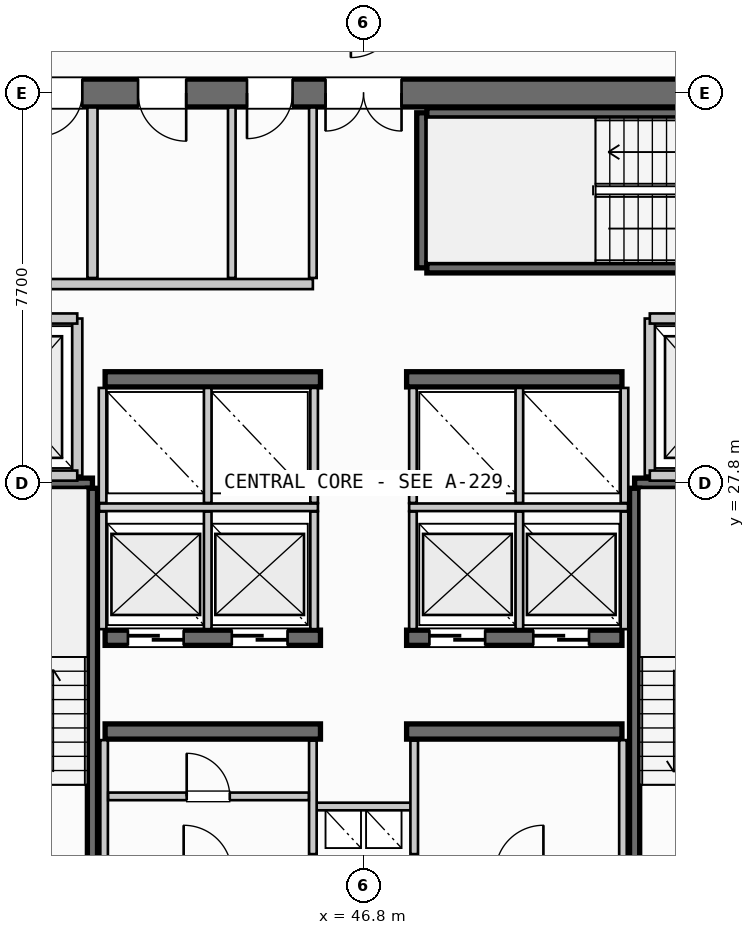
"""IFC4 building model, lengths in metres.
Left out: names, types, materials, properties, quantities, classifications, styles, units other than length and angle.
Written with IfcOpenShell. Run it as: python <this file> out.ifc"""

import sys

from ifc_helpers import new_model, si_unit, direction, frame, frame_2d, origin, place, context, subcontext, project, spatial, rectangle, extrude, source, transform, mapped, element, fill, save


model = new_model("IFC4")
c1 = context("Model", 3, precision=1e-05, world=origin(), true_north=direction((0.0, 1.0)))
c2 = subcontext(c1, "Body", "Model", "MODEL_VIEW")
j1 = project(units=[si_unit("LENGTHUNIT", "METRE"), si_unit("PLANEANGLEUNIT", "RADIAN")], contexts=[c1])
p1 = place(None, origin())
s1 = spatial("IfcSite", under=j1, at=p1, CompositionType="ELEMENT")
p2 = place(p1, origin())
s2 = spatial("IfcBuilding", under=s1, at=p2, CompositionType="ELEMENT")
p3 = place(p2, frame((0.0, 0.0, 211.4)))
s3 = spatial("IfcBuildingStorey", under=s2, at=p3, CompositionType="ELEMENT", Elevation=211.4)
p4 = place(p3, frame((55.6, 35.5, 0.0), z_axis=(0.0, 0.0, 1.0), x_axis=(-1.0, 0.0, 0.0)))
e1 = element("IfcWall", 1, at=p4, inside=s3, PredefinedType="SHEAR", context=c2, shape_type="SweptSolid", body=[
    extrude(rectangle(XDim=17.6, YDim=0.55, at=frame_2d((8.8, 0.0))), origin(), (0.0, 0.0, 1.0), 3.26),
])
p5 = place(p4, frame((8.05, 0.0, 0.0)))
e2 = element("IfcOpeningElement", 2, at=p5, cuts=e1, PredefinedType="OPENING", context=c2, shape_type="SweptSolid", body=[
    extrude(rectangle(XDim=1.5, YDim=2.2, at=frame_2d((0.75, 1.1))), frame((0.0, 0.285, 0.0), z_axis=(0.0, -1.0, 0.0), x_axis=(1.0, 0.0, 0.0)), (0.0, 0.0, 1.0), 0.57),
])
p6 = place(p4, frame((15.85, 0.0, 0.0)))
e3 = element("IfcOpeningElement", 3, at=p6, cuts=e1, PredefinedType="OPENING", context=c2, shape_type="SweptSolid", body=[
    extrude(rectangle(XDim=0.85, YDim=2.15, at=frame_2d((0.425, 1.075))), frame((0.0, 0.285, 0.0), z_axis=(0.0, -1.0, 0.0), x_axis=(1.0, 0.0, 0.0)), (0.0, 0.0, 1.0), 0.57),
])
p7 = place(p4, frame((14.35, 0.0, 0.0)))
e4 = element("IfcOpeningElement", 4, at=p7, cuts=e1, PredefinedType="OPENING", context=c2, shape_type="SweptSolid", body=[
    extrude(rectangle(XDim=0.85, YDim=2.15, at=frame_2d((0.425, 1.075))), frame((0.0, 0.285, 0.0), z_axis=(0.0, -1.0, 0.0), x_axis=(1.0, 0.0, 0.0)), (0.0, 0.0, 1.0), 0.57),
])
p8 = place(p4, frame((12.3, 0.0, 0.0)))
e5 = element("IfcOpeningElement", 5, at=p8, cuts=e1, PredefinedType="OPENING", context=c2, shape_type="SweptSolid", body=[
    extrude(rectangle(XDim=0.95, YDim=2.15, at=frame_2d((0.475, 1.075))), frame((0.0, 0.285, 0.0), z_axis=(0.0, -1.0, 0.0), x_axis=(1.0, 0.0, 0.0)), (0.0, 0.0, 1.0), 0.57),
])
p9 = place(p4, frame((10.2, 0.0, 0.0)))
e6 = element("IfcOpeningElement", 6, at=p9, cuts=e1, PredefinedType="OPENING", context=c2, shape_type="SweptSolid", body=[
    extrude(rectangle(XDim=0.9, YDim=2.15, at=frame_2d((0.45, 1.075))), frame((0.0, 0.285, 0.0), z_axis=(0.0, -1.0, 0.0), x_axis=(1.0, 0.0, 0.0)), (0.0, 0.0, 1.0), 0.57),
])
for number, where, z_axis, x_axis in (
    (7, (41.7, 22.9, 0.0), (0.0, 0.0, 1.0), (1.0, 0.0, 0.0)),
    (8, (47.65, 22.9, 0.0), (0.0, 0.0, 1.0), (1.0, 0.0, 0.0)),
):
    element("IfcWall", number, at=place(p3, frame(where, z_axis=z_axis, x_axis=x_axis)), inside=s3, PredefinedType="SHEAR", context=c2, shape_type="SweptSolid", body=[
        extrude(rectangle(XDim=4.25, YDim=0.3, at=frame_2d((2.125, 0.0))), origin(), (0.0, 0.0, 1.0), 3.26),
    ])
p10 = place(p3, frame((41.7, 24.75, 0.0), z_axis=(0.0, 0.0, 1.0), x_axis=(1.0, 0.0, 0.0)))
e9 = element("IfcWall", 9, at=p10, inside=s3, PredefinedType="SHEAR", context=c2, shape_type="SweptSolid", body=[
    extrude(rectangle(XDim=4.25, YDim=0.3, at=frame_2d((2.125, 0.0))), origin(), (0.0, 0.0, 1.0), 3.26),
])
p11 = place(p10, frame((0.45, 0.0, 0.0)))
e10 = element("IfcOpeningElement", 10, at=p11, cuts=e9, PredefinedType="OPENING", context=c2, shape_type="SweptSolid", body=[
    extrude(rectangle(XDim=1.1, YDim=2.2, at=frame_2d((0.55, 1.1))), frame((0.0, 0.16, 0.0), z_axis=(0.0, -1.0, 0.0), x_axis=(1.0, 0.0, 0.0)), (0.0, 0.0, 1.0), 0.32),
])
p12 = place(p10, frame((2.5, 0.0, 0.0)))
e11 = element("IfcOpeningElement", 11, at=p12, cuts=e9, PredefinedType="OPENING", context=c2, shape_type="SweptSolid", body=[
    extrude(rectangle(XDim=1.1, YDim=2.2, at=frame_2d((0.55, 1.1))), frame((0.0, 0.16, 0.0), z_axis=(0.0, -1.0, 0.0), x_axis=(1.0, 0.0, 0.0)), (0.0, 0.0, 1.0), 0.32),
])
p13 = place(p3, frame((47.65, 24.75, 0.0), z_axis=(0.0, 0.0, 1.0), x_axis=(1.0, 0.0, 0.0)))
e12 = element("IfcWall", 12, at=p13, inside=s3, PredefinedType="SHEAR", context=c2, shape_type="SweptSolid", body=[
    extrude(rectangle(XDim=4.25, YDim=0.3, at=frame_2d((2.125, 0.0))), origin(), (0.0, 0.0, 1.0), 3.26),
])
p14 = place(p13, frame((0.45, 0.0, 0.0)))
e13 = element("IfcOpeningElement", 13, at=p14, cuts=e12, PredefinedType="OPENING", context=c2, shape_type="SweptSolid", body=[
    extrude(rectangle(XDim=1.1, YDim=2.2, at=frame_2d((0.55, 1.1))), frame((0.0, 0.16, 0.0), z_axis=(0.0, -1.0, 0.0), x_axis=(1.0, 0.0, 0.0)), (0.0, 0.0, 1.0), 0.32),
])
p15 = place(p13, frame((2.5, 0.0, 0.0)))
e14 = element("IfcOpeningElement", 14, at=p15, cuts=e12, PredefinedType="OPENING", context=c2, shape_type="SweptSolid", body=[
    extrude(rectangle(XDim=1.1, YDim=2.2, at=frame_2d((0.55, 1.1))), frame((0.0, 0.16, 0.0), z_axis=(0.0, -1.0, 0.0), x_axis=(1.0, 0.0, 0.0)), (0.0, 0.0, 1.0), 0.32),
])
for number, where, z_axis, x_axis in (
    (15, (41.7, 29.85, 0.0), (0.0, 0.0, 1.0), (1.0, 0.0, 0.0)),
    (16, (47.65, 29.85, 0.0), (0.0, 0.0, 1.0), (1.0, 0.0, 0.0)),
):
    element("IfcWall", number, at=place(p3, frame(where, z_axis=z_axis, x_axis=x_axis)), inside=s3, PredefinedType="SHEAR", context=c2, shape_type="SweptSolid", body=[
        extrude(rectangle(XDim=4.25, YDim=0.3, at=frame_2d((2.125, 0.0))), origin(), (0.0, 0.0, 1.0), 3.26),
    ])
p16 = place(p3, frame((38.39, 27.8, 0.0), z_axis=(0.0, 0.0, 1.0), x_axis=(1.0, 0.0, 0.0)))
e17 = element("IfcWall", 17, at=p16, inside=s3, PredefinedType="SHEAR", context=c2, shape_type="SweptSolid", body=[
    extrude(rectangle(XDim=3.06, YDim=0.2, at=frame_2d((1.53, 0.0))), origin(), (0.0, 0.0, 1.0), 3.26),
])
p17 = place(p3, frame((41.45, 27.7, 0.0), z_axis=(0.0, 0.0, 1.0), x_axis=(0.0, -1.0, 0.0)))
e18 = element("IfcWall", 18, at=p17, inside=s3, PredefinedType="SHEAR", context=c2, shape_type="SweptSolid", body=[
    extrude(rectangle(XDim=7.35, YDim=0.2, at=frame_2d((3.675, 0.0))), origin(), (0.0, 0.0, 1.0), 3.26),
])
p18 = place(p3, frame((52.15, 27.8, 0.0), z_axis=(0.0, 0.0, 1.0), x_axis=(1.0, 0.0, 0.0)))
e19 = element("IfcWall", 19, at=p18, inside=s3, PredefinedType="SHEAR", context=c2, shape_type="SweptSolid", body=[
    extrude(rectangle(XDim=3.06, YDim=0.2, at=frame_2d((1.53, 0.0))), origin(), (0.0, 0.0, 1.0), 3.26),
])
p19 = place(p3, frame((52.15, 20.35, 0.0), z_axis=(0.0, 0.0, 1.0), x_axis=(0.0, 1.0, 0.0)))
e20 = element("IfcWall", 20, at=p19, inside=s3, PredefinedType="SHEAR", context=c2, shape_type="SweptSolid", body=[
    extrude(rectangle(XDim=7.35, YDim=0.2, at=frame_2d((3.675, 0.0))), origin(), (0.0, 0.0, 1.0), 3.26),
])
p20 = place(p3, frame((47.95, 32.05, 0.0), z_axis=(0.0, 0.0, 1.0), x_axis=(0.0, 1.0, 0.0)))
e21 = element("IfcWall", 21, at=p20, inside=s3, PredefinedType="SHEAR", context=c2, shape_type="SweptSolid", body=[
    extrude(rectangle(XDim=3.06, YDim=0.2, at=frame_2d((1.53, 0.0))), origin(), (0.0, 0.0, 1.0), 3.26),
])
for number, where, z_axis, x_axis in (
    (22, (48.05, 35.11, 0.0), (0.0, 0.0, 1.0), (1.0, 0.0, 0.0)),
    (23, (55.4, 32.05, 0.0), (0.0, 0.0, 1.0), (-1.0, 0.0, 0.0)),
):
    element("IfcWall", number, at=place(p3, frame(where, z_axis=z_axis, x_axis=x_axis)), inside=s3, PredefinedType="SHEAR", context=c2, shape_type="SweptSolid", body=[
        extrude(rectangle(XDim=7.35, YDim=0.2, at=frame_2d((3.675, 0.0))), origin(), (0.0, 0.0, 1.0), 3.26),
    ])
p21 = place(p3, frame((45.8, 21.42, 0.0), z_axis=(0.0, 0.0, 1.0), x_axis=(1.0, 0.0, 0.0)))
e24 = element("IfcWall", 24, at=p21, inside=s3, PredefinedType="PARTITIONING", context=c2, shape_type="SweptSolid", body=[
    extrude(rectangle(XDim=2.0, YDim=0.15, at=frame_2d((1.0, 0.0))), origin(), (0.0, 0.0, 1.0), 2.455),
])
for number, where, z_axis, x_axis in (
    (25, (45.8, 20.48, 0.0), (0.0, 0.0, 1.0), (0.0, 1.0, 0.0)),
    (26, (47.8, 20.48, 0.0), (0.0, 0.0, 1.0), (0.0, 1.0, 0.0)),
):
    element("IfcWall", number, at=place(p3, frame(where, z_axis=z_axis, x_axis=x_axis)), inside=s3, PredefinedType="PARTITIONING", context=c2, shape_type="SweptSolid", body=[
        extrude(rectangle(XDim=2.24, YDim=0.15, at=frame_2d((1.12, 0.0))), origin(), (0.0, 0.0, 1.0), 2.455),
    ])
p22 = place(p3, frame((41.15, 27.95, 0.0), z_axis=(0.0, 0.0, 1.0), x_axis=(0.0, 1.0, 0.0)))
e27 = element("IfcWall", 27, at=p22, inside=s3, PredefinedType="PARTITIONING", context=c2, shape_type="SweptSolid", body=[
    extrude(rectangle(XDim=3.1, YDim=0.2, at=frame_2d((1.55, 0.0))), origin(), (0.0, 0.0, 1.0), 2.455),
])
for number, where, z_axis, x_axis in (
    (28, (38.285, 27.95, 0.0), (0.0, 0.0, 1.0), (1.0, 0.0, 0.0)),
    (29, (38.285, 31.05, 0.0), (0.0, 0.0, 1.0), (1.0, 0.0, 0.0)),
):
    element("IfcWall", number, at=place(p3, frame(where, z_axis=z_axis, x_axis=x_axis)), inside=s3, PredefinedType="PARTITIONING", context=c2, shape_type="SweptSolid", body=[
        extrude(rectangle(XDim=2.865, YDim=0.2, at=frame_2d((1.433, 0.0))), origin(), (0.0, 0.0, 1.0), 2.455),
    ])
p23 = place(p3, frame((52.45, 27.95, 0.0), z_axis=(0.0, 0.0, 1.0), x_axis=(0.0, 1.0, 0.0)))
e30 = element("IfcWall", 30, at=p23, inside=s3, PredefinedType="PARTITIONING", context=c2, shape_type="SweptSolid", body=[
    extrude(rectangle(XDim=3.1, YDim=0.2, at=frame_2d((1.55, 0.0))), origin(), (0.0, 0.0, 1.0), 2.455),
])
for number, where, z_axis, x_axis in (
    (31, (52.45, 27.95, 0.0), (0.0, 0.0, 1.0), (1.0, 0.0, 0.0)),
    (32, (52.45, 31.05, 0.0), (0.0, 0.0, 1.0), (1.0, 0.0, 0.0)),
):
    element("IfcWall", number, at=place(p3, frame(where, z_axis=z_axis, x_axis=x_axis)), inside=s3, PredefinedType="PARTITIONING", context=c2, shape_type="SweptSolid", body=[
        extrude(rectangle(XDim=2.865, YDim=0.2, at=frame_2d((1.433, 0.0))), origin(), (0.0, 0.0, 1.0), 2.455),
    ])
for number, where, z_axis, x_axis in (
    (33, (41.68, 20.385, 0.0), (0.0, 0.0, 1.0), (0.0, 1.0, 0.0)),
    (34, (51.92, 20.385, 0.0), (0.0, 0.0, 1.0), (0.0, 1.0, 0.0)),
):
    element("IfcWall", number, at=place(p3, frame(where, z_axis=z_axis, x_axis=x_axis)), inside=s3, PredefinedType="PARTITIONING", context=c2, shape_type="SweptSolid", body=[
        extrude(rectangle(XDim=2.345, YDim=0.15, at=frame_2d((1.172, 0.0))), origin(), (0.0, 0.0, 1.0), 2.455),
    ])
p24 = place(p3, frame((41.76, 21.62, 0.0), z_axis=(0.0, 0.0, 1.0), x_axis=(1.0, 0.0, 0.0)))
e35 = element("IfcWall", 35, at=p24, inside=s3, PredefinedType="PARTITIONING", context=c2, shape_type="SweptSolid", body=[
    extrude(rectangle(XDim=3.96, YDim=0.15, at=frame_2d((1.98, 0.0))), origin(), (0.0, 0.0, 1.0), 2.455),
])
p25 = place(p24, frame((1.55, 0.0, 0.0)))
e36 = element("IfcOpeningElement", 36, at=p25, cuts=e35, PredefinedType="OPENING", context=c2, shape_type="SweptSolid", body=[
    extrude(rectangle(XDim=0.85, YDim=2.15, at=frame_2d((0.425, 1.075))), frame((0.0, 0.085, 0.0), z_axis=(0.0, -1.0, 0.0), x_axis=(1.0, 0.0, 0.0)), (0.0, 0.0, 1.0), 0.17),
])
p26 = place(p3, frame((41.58, 27.325, 0.0), z_axis=(0.0, 0.0, 1.0), x_axis=(1.0, 0.0, 0.0)))
e37 = element("IfcWall", 37, at=p26, inside=s3, PredefinedType="PARTITIONING", context=c2, shape_type="SweptSolid", body=[
    extrude(rectangle(XDim=4.32, YDim=0.15, at=frame_2d((2.16, 0.0))), origin(), (0.0, 0.0, 1.0), 2.455),
])
p27 = place(p3, frame((47.7, 27.325, 0.0), z_axis=(0.0, 0.0, 1.0), x_axis=(1.0, 0.0, 0.0)))
e38 = element("IfcWall", 38, at=p27, inside=s3, PredefinedType="PARTITIONING", context=c2, shape_type="SweptSolid", body=[
    extrude(rectangle(XDim=4.32, YDim=0.15, at=frame_2d((2.16, 0.0))), origin(), (0.0, 0.0, 1.0), 2.455),
])
for number, where, z_axis, x_axis in (
    (39, (41.65, 24.92, 0.0), (0.0, 0.0, 1.0), (0.0, 1.0, 0.0)),
    (40, (43.725, 24.92, 0.0), (0.0, 0.0, 1.0), (0.0, 1.0, 0.0)),
    (41, (45.825, 24.92, 0.0), (0.0, 0.0, 1.0), (0.0, 1.0, 0.0)),
    (42, (47.775, 24.92, 0.0), (0.0, 0.0, 1.0), (0.0, 1.0, 0.0)),
    (43, (49.875, 24.92, 0.0), (0.0, 0.0, 1.0), (0.0, 1.0, 0.0)),
    (44, (51.95, 24.92, 0.0), (0.0, 0.0, 1.0), (0.0, 1.0, 0.0)),
):
    element("IfcWall", number, at=place(p3, frame(where, z_axis=z_axis, x_axis=x_axis)), inside=s3, PredefinedType="PARTITIONING", context=c2, shape_type="SweptSolid", body=[
        extrude(rectangle(XDim=2.32, YDim=0.15, at=frame_2d((1.16, 0.0))), origin(), (0.0, 0.0, 1.0), 2.455),
    ])
for number, where, z_axis, x_axis in (
    (45, (41.65, 27.41, 0.0), (0.0, 0.0, 1.0), (0.0, 1.0, 0.0)),
    (46, (43.725, 27.41, 0.0), (0.0, 0.0, 1.0), (0.0, 1.0, 0.0)),
    (47, (45.825, 27.41, 0.0), (0.0, 0.0, 1.0), (0.0, 1.0, 0.0)),
    (48, (47.775, 27.41, 0.0), (0.0, 0.0, 1.0), (0.0, 1.0, 0.0)),
    (49, (49.875, 27.41, 0.0), (0.0, 0.0, 1.0), (0.0, 1.0, 0.0)),
    (50, (51.95, 27.41, 0.0), (0.0, 0.0, 1.0), (0.0, 1.0, 0.0)),
):
    element("IfcWall", number, at=place(p3, frame(where, z_axis=z_axis, x_axis=x_axis)), inside=s3, PredefinedType="PARTITIONING", context=c2, shape_type="SweptSolid", body=[
        extrude(rectangle(XDim=2.27, YDim=0.15, at=frame_2d((1.135, 0.0))), origin(), (0.0, 0.0, 1.0), 2.455),
    ])
p28 = place(p3, frame((41.45, 31.85, 0.0), z_axis=(0.0, 0.0, 1.0), x_axis=(0.0, 1.0, 0.0)))
e51 = element("IfcWall", 51, at=p28, inside=s3, PredefinedType="PARTITIONING", context=c2, shape_type="SweptSolid", body=[
    extrude(rectangle(XDim=3.365, YDim=0.2, at=frame_2d((1.683, 0.0))), origin(), (0.0, 0.0, 1.0), 2.455),
])
p29 = place(p3, frame((38.285, 31.73, 0.0), z_axis=(0.0, 0.0, 1.0), x_axis=(1.0, 0.0, 0.0)))
e52 = element("IfcWall", 52, at=p29, inside=s3, PredefinedType="PARTITIONING", context=c2, shape_type="SweptSolid", body=[
    extrude(rectangle(XDim=7.515, YDim=0.2, at=frame_2d((3.758, 0.0))), origin(), (0.0, 0.0, 1.0), 2.455),
])
p30 = place(p3, frame((45.8, 31.85, 0.0), z_axis=(0.0, 0.0, 1.0), x_axis=(0.0, 1.0, 0.0)))
e53 = element("IfcWall", 53, at=p30, inside=s3, PredefinedType="PARTITIONING", context=c2, shape_type="SweptSolid", body=[
    extrude(rectangle(XDim=3.365, YDim=0.15, at=frame_2d((1.683, 0.0))), origin(), (0.0, 0.0, 1.0), 2.455),
])
p31 = place(p3, frame((44.2, 31.85, 0.0), z_axis=(0.0, 0.0, 1.0), x_axis=(0.0, 1.0, 0.0)))
e54 = element("IfcWall", 54, at=p31, inside=s3, PredefinedType="PLUMBINGWALL", context=c2, shape_type="SweptSolid", body=[
    extrude(rectangle(XDim=3.365, YDim=0.15, at=frame_2d((1.683, 0.0))), origin(), (0.0, 0.0, 1.0), 2.455),
])
m1 = source(origin(), c2, "Body", "SweptSolid", [
    extrude(rectangle(XDim=1.5, YDim=2.2, at=frame_2d((0.75, 1.1))), frame((0.0, 0.025, 0.0), z_axis=(0.0, -1.0, 0.0), x_axis=(1.0, 0.0, 0.0)), (0.0, 0.0, 1.0), 0.05),
])
p32 = place(p5, origin())
e55 = element("IfcDoor", 55, at=p32, inside=s3, OperationType="DOUBLE_DOOR_SINGLE_SWING", PredefinedType="DOOR", context=c2, shape_type="MappedRepresentation", body=[
    mapped(m1, transform((0.0, 0.0, 0.0), scale=1.0)),
])
fill(e2, e55)
m2 = source(origin(), c2, "Body", "SweptSolid", [
    extrude(rectangle(XDim=1.1, YDim=2.2, at=frame_2d((0.55, 1.1))), frame((0.0, 0.025, 0.0), z_axis=(0.0, -1.0, 0.0), x_axis=(1.0, 0.0, 0.0)), (0.0, 0.0, 1.0), 0.05),
])
p33 = place(p11, origin())
e56 = element("IfcDoor", 56, at=p33, inside=s3, OperationType="SLIDING_TO_RIGHT", PredefinedType="DOOR", context=c2, shape_type="MappedRepresentation", body=[
    mapped(m2, transform((0.0, 0.0, 0.0), scale=1.0)),
])
fill(e10, e56)
p34 = place(p12, origin())
e57 = element("IfcDoor", 57, at=p34, inside=s3, OperationType="SLIDING_TO_RIGHT", PredefinedType="DOOR", context=c2, shape_type="MappedRepresentation", body=[
    mapped(m2, transform((0.0, 0.0, 0.0), scale=1.0)),
])
fill(e11, e57)
p35 = place(p14, origin())
e58 = element("IfcDoor", 58, at=p35, inside=s3, OperationType="SLIDING_TO_RIGHT", PredefinedType="DOOR", context=c2, shape_type="MappedRepresentation", body=[
    mapped(m2, transform((0.0, 0.0, 0.0), scale=1.0)),
])
fill(e13, e58)
p36 = place(p15, origin())
e59 = element("IfcDoor", 59, at=p36, inside=s3, OperationType="SLIDING_TO_RIGHT", PredefinedType="DOOR", context=c2, shape_type="MappedRepresentation", body=[
    mapped(m2, transform((0.0, 0.0, 0.0), scale=1.0)),
])
fill(e14, e59)
m3 = source(origin(), c2, "Body", "SweptSolid", [
    extrude(rectangle(XDim=0.85, YDim=2.15, at=frame_2d((0.425, 1.075))), frame((0.0, 0.025, 0.0), z_axis=(0.0, -1.0, 0.0), x_axis=(1.0, 0.0, 0.0)), (0.0, 0.0, 1.0), 0.05),
])
p37 = place(p7, origin())
e60 = element("IfcDoor", 60, at=p37, inside=s3, OperationType="SINGLE_SWING_RIGHT", PredefinedType="DOOR", context=c2, shape_type="MappedRepresentation", body=[
    mapped(m3, transform((0.0, 0.0, 0.0), scale=1.0)),
])
fill(e4, e60)
m4 = source(origin(), c2, "Body", "SweptSolid", [
    extrude(rectangle(XDim=0.95, YDim=2.15, at=frame_2d((0.475, 1.075))), frame((0.0, 0.025, 0.0), z_axis=(0.0, -1.0, 0.0), x_axis=(1.0, 0.0, 0.0)), (0.0, 0.0, 1.0), 0.05),
])
p38 = place(p8, origin())
e61 = element("IfcDoor", 61, at=p38, inside=s3, OperationType="SINGLE_SWING_LEFT", PredefinedType="DOOR", context=c2, shape_type="MappedRepresentation", body=[
    mapped(m4, transform((0.0, 0.0, 0.0), scale=1.0)),
])
fill(e5, e61)
m5 = source(origin(), c2, "Body", "SweptSolid", [
    extrude(rectangle(XDim=0.9, YDim=2.15, at=frame_2d((0.45, 1.075))), frame((0.0, 0.025, 0.0), z_axis=(0.0, -1.0, 0.0), x_axis=(1.0, 0.0, 0.0)), (0.0, 0.0, 1.0), 0.05),
])
p39 = place(p9, origin())
e62 = element("IfcDoor", 62, at=p39, inside=s3, OperationType="SINGLE_SWING_RIGHT", PredefinedType="DOOR", context=c2, shape_type="MappedRepresentation", body=[
    mapped(m5, transform((0.0, 0.0, 0.0), scale=1.0)),
])
fill(e6, e62)
p40 = place(p25, origin())
e63 = element("IfcDoor", 63, at=p40, inside=s3, OperationType="SINGLE_SWING_LEFT", PredefinedType="DOOR", context=c2, shape_type="MappedRepresentation", body=[
    mapped(m3, transform((0.0, 0.0, 0.0), scale=1.0)),
])
fill(e36, e63)
save(model, sys.argv[1])
